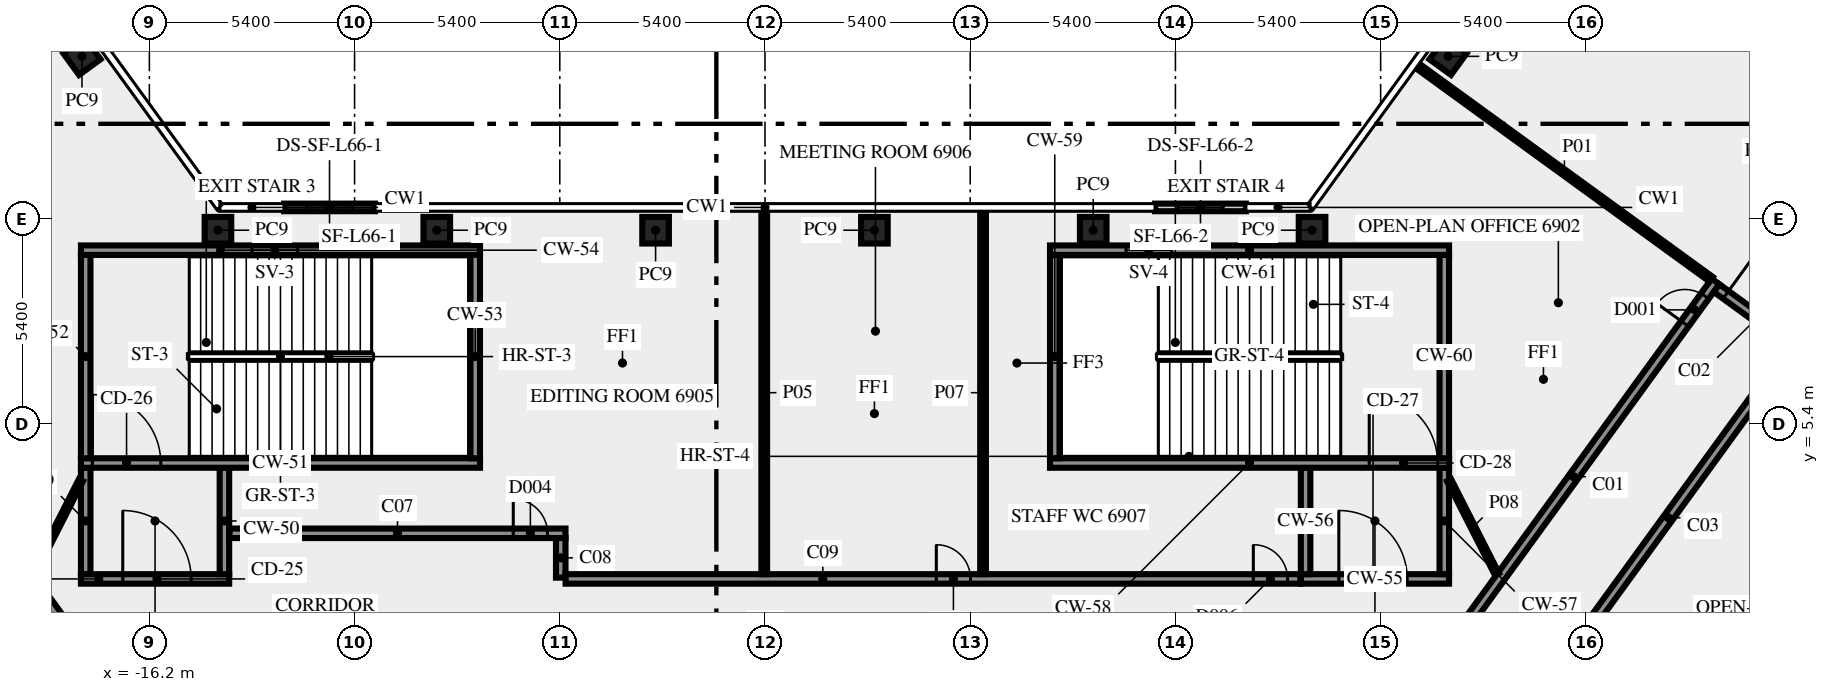
"""IFC4 building model, lengths in metres.
Left out: names, types, materials, properties, quantities, classifications, styles, units other than length and angle.
Written with IfcOpenShell. Run it as: python <this file> out.ifc"""

import sys

from ifc_helpers import new_model, si_unit, direction, frame, frame_2d, origin, origin_2d, place, context, subcontext, project, spatial, rectangle, extrude, element, fill, save


model = new_model("IFC4")
c1 = context("Model", 3, precision=1e-05, world=origin(), true_north=direction((0.0, 1.0)))
c2 = subcontext(c1, "Body", "Model", "MODEL_VIEW")
j1 = project(units=[si_unit("LENGTHUNIT", "METRE"), si_unit("PLANEANGLEUNIT", "RADIAN")], contexts=[c1])
p1 = place(None, origin())
s1 = spatial("IfcSite", under=j1, at=p1, CompositionType="ELEMENT")
p2 = place(p1, origin())
s2 = spatial("IfcBuilding", under=s1, at=p2, CompositionType="ELEMENT")
p3 = place(p2, frame((0.0, 0.0, 297.0)))
s3 = spatial("IfcBuildingStorey", under=s2, at=p3, CompositionType="ELEMENT", Elevation=297.0)
for number, where, z_axis, x_axis in (
    (1, (-17.974, 15.075, 0.0), (0.0, 0.0, 1.0), (-0.588, 0.809, 0.0)),
    (2, (17.974, 15.075, 0.0), (0.0, 0.0, 1.0), (-0.588, -0.809, 0.0)),
    (3, (14.395, 10.5, 0.0), (0.0, 0.0, 1.0), (-1.0, 0.0, 0.0)),
    (4, (8.637, 10.5, 0.0), (0.0, 0.0, 1.0), (-1.0, 0.0, 0.0)),
    (5, (2.879, 10.5, 0.0), (0.0, 0.0, 1.0), (-1.0, 0.0, 0.0)),
    (6, (-2.879, 10.5, 0.0), (0.0, 0.0, 1.0), (-1.0, 0.0, 0.0)),
    (7, (-8.637, 10.5, 0.0), (0.0, 0.0, 1.0), (-1.0, 0.0, 0.0)),
    (8, (-14.395, 10.5, 0.0), (0.0, 0.0, 1.0), (-1.0, 0.0, 0.0)),
):
    element("IfcColumn", number, at=place(p3, frame(where, z_axis=z_axis, x_axis=x_axis)), inside=s3, PredefinedType="COLUMN", context=c2, shape_type="SweptSolid", body=[
        extrude(rectangle(XDim=0.7, YDim=0.7, at=origin_2d()), origin(), (0.0, 0.0, 1.0), 3.4),
    ])
p4 = place(p3, frame((12.655, 11.1, 0.0), z_axis=(0.0, 0.0, 1.0), x_axis=(-1.0, 0.0, 0.0)))
e9 = element("IfcWall", 9, at=p4, inside=s3, PredefinedType="SOLIDWALL", context=c2, shape_type="SweptSolid", body=[
    extrude(rectangle(XDim=2.392, YDim=0.2, at=frame_2d((1.196, 0.0))), origin(), (0.0, 0.0, 1.0), 3.4),
])
p5 = place(p4, frame((0.596, 0.0, 1.0)))
e10 = element("IfcOpeningElement", 10, at=p5, cuts=e9, PredefinedType="OPENING", context=c2, shape_type="SweptSolid", body=[
    extrude(rectangle(XDim=1.2, YDim=1.2, at=frame_2d((0.6, 0.6))), frame((0.0, 0.11, 0.0), z_axis=(0.0, -1.0, 0.0), x_axis=(1.0, 0.0, 0.0)), (0.0, 0.0, 1.0), 0.22),
])
p6 = place(p3, frame((-10.263, 11.1, 0.0), z_axis=(0.0, 0.0, 1.0), x_axis=(-1.0, 0.0, 0.0)))
e11 = element("IfcWall", 11, at=p6, inside=s3, PredefinedType="SOLIDWALL", context=c2, shape_type="SweptSolid", body=[
    extrude(rectangle(XDim=2.392, YDim=0.2, at=frame_2d((1.196, 0.0))), origin(), (0.0, 0.0, 1.0), 3.4),
])
p7 = place(p6, frame((0.596, 0.0, 1.0)))
e12 = element("IfcOpeningElement", 12, at=p7, cuts=e11, PredefinedType="OPENING", context=c2, shape_type="SweptSolid", body=[
    extrude(rectangle(XDim=1.2, YDim=1.2, at=frame_2d((0.6, 0.6))), frame((0.0, 0.11, 0.0), z_axis=(0.0, -1.0, 0.0), x_axis=(1.0, 0.0, 0.0)), (0.0, 0.0, 1.0), 0.22),
])
p8 = place(p3, frame((-18.0, 1.325, 0.0), z_axis=(0.0, 0.0, 1.0), x_axis=(1.0, 0.0, 0.0)))
e13 = element("IfcWall", 13, at=p8, inside=s3, PredefinedType="SHEAR", context=c2, shape_type="SweptSolid", body=[
    extrude(rectangle(XDim=3.9, YDim=0.25, at=frame_2d((1.95, 0.0))), origin(), (0.0, 0.0, 1.0), 3.4),
])
p9 = place(p8, frame((1.1, 0.0, 0.0)))
e14 = element("IfcOpeningElement", 14, at=p9, cuts=e13, PredefinedType="OPENING", context=c2, shape_type="SweptSolid", body=[
    extrude(rectangle(XDim=1.8, YDim=2.1, at=frame_2d((0.9, 1.05))), frame((0.0, 0.135, 0.0), z_axis=(0.0, -1.0, 0.0), x_axis=(1.0, 0.0, 0.0)), (0.0, 0.0, 1.0), 0.27),
])
for number, where, z_axis, x_axis in (
    (15, (-17.875, 1.45, 0.0), (0.0, 0.0, 1.0), (0.0, 1.0, 0.0)),
    (16, (-14.225, 1.45, 0.0), (0.0, 0.0, 1.0), (0.0, 1.0, 0.0)),
):
    element("IfcWall", number, at=place(p3, frame(where, z_axis=z_axis, x_axis=x_axis)), inside=s3, PredefinedType="SHEAR", context=c2, shape_type="SweptSolid", body=[
        extrude(rectangle(XDim=2.8, YDim=0.25, at=frame_2d((1.4, 0.0))), origin(), (0.0, 0.0, 1.0), 3.4),
    ])
p10 = place(p3, frame((-18.0, 4.375, 0.0), z_axis=(0.0, 0.0, 1.0), x_axis=(1.0, 0.0, 0.0)))
e17 = element("IfcWall", 17, at=p10, inside=s3, PredefinedType="SHEAR", context=c2, shape_type="SweptSolid", body=[
    extrude(rectangle(XDim=10.5, YDim=0.25, at=frame_2d((5.25, 0.0))), origin(), (0.0, 0.0, 1.0), 3.4),
])
p11 = place(p10, frame((0.3, 0.0, 0.0)))
e18 = element("IfcOpeningElement", 18, at=p11, cuts=e17, PredefinedType="OPENING", context=c2, shape_type="SweptSolid", body=[
    extrude(rectangle(XDim=1.8, YDim=2.1, at=frame_2d((0.9, 1.05))), frame((0.0, 0.135, 0.0), z_axis=(0.0, -1.0, 0.0), x_axis=(1.0, 0.0, 0.0)), (0.0, 0.0, 1.0), 0.27),
])
for number, where, z_axis, x_axis in (
    (19, (-17.875, 4.5, 0.0), (0.0, 0.0, 1.0), (0.0, 1.0, 0.0)),
    (20, (-7.625, 4.5, 0.0), (0.0, 0.0, 1.0), (0.0, 1.0, 0.0)),
):
    element("IfcWall", number, at=place(p3, frame(where, z_axis=z_axis, x_axis=x_axis)), inside=s3, PredefinedType="SHEAR", context=c2, shape_type="SweptSolid", body=[
        extrude(rectangle(XDim=5.35, YDim=0.25, at=frame_2d((2.675, 0.0))), origin(), (0.0, 0.0, 1.0), 3.4),
    ])
p12 = place(p3, frame((-18.0, 9.975, 0.0), z_axis=(0.0, 0.0, 1.0), x_axis=(1.0, 0.0, 0.0)))
e21 = element("IfcWall", 21, at=p12, inside=s3, PredefinedType="SHEAR", context=c2, shape_type="SweptSolid", body=[
    extrude(rectangle(XDim=10.5, YDim=0.25, at=frame_2d((5.25, 0.0))), origin(), (0.0, 0.0, 1.0), 3.4),
])
p13 = place(p12, frame((4.5, 0.0, 1.0)))
e22 = element("IfcOpeningElement", 22, at=p13, cuts=e21, PredefinedType="OPENING", context=c2, shape_type="SweptSolid", body=[
    extrude(rectangle(XDim=1.2, YDim=1.2, at=frame_2d((0.6, 0.6))), frame((0.0, 0.135, 0.0), z_axis=(0.0, -1.0, 0.0), x_axis=(1.0, 0.0, 0.0)), (0.0, 0.0, 1.0), 0.27),
])
p14 = place(p3, frame((14.1, 1.325, 0.0), z_axis=(0.0, 0.0, 1.0), x_axis=(1.0, 0.0, 0.0)))
e23 = element("IfcWall", 23, at=p14, inside=s3, PredefinedType="SHEAR", context=c2, shape_type="SweptSolid", body=[
    extrude(rectangle(XDim=3.9, YDim=0.25, at=frame_2d((1.95, 0.0))), origin(), (0.0, 0.0, 1.0), 3.4),
])
p15 = place(p14, frame((1.0, 0.0, 0.0)))
e24 = element("IfcOpeningElement", 24, at=p15, cuts=e23, PredefinedType="OPENING", context=c2, shape_type="SweptSolid", body=[
    extrude(rectangle(XDim=1.8, YDim=2.1, at=frame_2d((0.9, 1.05))), frame((0.0, 0.135, 0.0), z_axis=(0.0, -1.0, 0.0), x_axis=(1.0, 0.0, 0.0)), (0.0, 0.0, 1.0), 0.27),
])
for number, where, z_axis, x_axis in (
    (25, (14.225, 1.45, 0.0), (0.0, 0.0, 1.0), (0.0, 1.0, 0.0)),
    (26, (17.875, 1.45, 0.0), (0.0, 0.0, 1.0), (0.0, 1.0, 0.0)),
):
    element("IfcWall", number, at=place(p3, frame(where, z_axis=z_axis, x_axis=x_axis)), inside=s3, PredefinedType="SHEAR", context=c2, shape_type="SweptSolid", body=[
        extrude(rectangle(XDim=2.8, YDim=0.25, at=frame_2d((1.4, 0.0))), origin(), (0.0, 0.0, 1.0), 3.4),
    ])
p16 = place(p3, frame((7.5, 4.375, 0.0), z_axis=(0.0, 0.0, 1.0), x_axis=(1.0, 0.0, 0.0)))
e27 = element("IfcWall", 27, at=p16, inside=s3, PredefinedType="SHEAR", context=c2, shape_type="SweptSolid", body=[
    extrude(rectangle(XDim=10.5, YDim=0.25, at=frame_2d((5.25, 0.0))), origin(), (0.0, 0.0, 1.0), 3.4),
])
p17 = place(p16, frame((8.4, 0.0, 0.0)))
e28 = element("IfcOpeningElement", 28, at=p17, cuts=e27, PredefinedType="OPENING", context=c2, shape_type="SweptSolid", body=[
    extrude(rectangle(XDim=1.8, YDim=2.1, at=frame_2d((0.9, 1.05))), frame((0.0, 0.135, 0.0), z_axis=(0.0, -1.0, 0.0), x_axis=(1.0, 0.0, 0.0)), (0.0, 0.0, 1.0), 0.27),
])
for number, where, z_axis, x_axis in (
    (29, (7.625, 4.5, 0.0), (0.0, 0.0, 1.0), (0.0, 1.0, 0.0)),
    (30, (17.875, 4.5, 0.0), (0.0, 0.0, 1.0), (0.0, 1.0, 0.0)),
):
    element("IfcWall", number, at=place(p3, frame(where, z_axis=z_axis, x_axis=x_axis)), inside=s3, PredefinedType="SHEAR", context=c2, shape_type="SweptSolid", body=[
        extrude(rectangle(XDim=5.35, YDim=0.25, at=frame_2d((2.675, 0.0))), origin(), (0.0, 0.0, 1.0), 3.4),
    ])
p18 = place(p3, frame((7.5, 9.975, 0.0), z_axis=(0.0, 0.0, 1.0), x_axis=(1.0, 0.0, 0.0)))
e31 = element("IfcWall", 31, at=p18, inside=s3, PredefinedType="SHEAR", context=c2, shape_type="SweptSolid", body=[
    extrude(rectangle(XDim=10.5, YDim=0.25, at=frame_2d((5.25, 0.0))), origin(), (0.0, 0.0, 1.0), 3.4),
])
p19 = place(p18, frame((2.0, 0.0, 1.0)))
e32 = element("IfcOpeningElement", 32, at=p19, cuts=e31, PredefinedType="OPENING", context=c2, shape_type="SweptSolid", body=[
    extrude(rectangle(XDim=1.2, YDim=1.2, at=frame_2d((0.6, 0.6))), frame((0.0, 0.135, 0.0), z_axis=(0.0, -1.0, 0.0), x_axis=(1.0, 0.0, 0.0)), (0.0, 0.0, 1.0), 0.27),
])
p20 = place(p3, frame((17.545, -1.125, 0.0), z_axis=(0.0, 0.0, 1.0), x_axis=(0.587796810203, 0.809008596935, 0.0)))
e33 = element("IfcWall", 33, at=p20, inside=s3, PredefinedType="SOLIDWALL", context=c2, shape_type="SweptSolid", body=[
    extrude(rectangle(XDim=12.703, YDim=0.25, at=frame_2d((6.352, 0.0))), origin(), (0.0, 0.0, 1.0), 3.4),
])
p21 = place(p20, frame((11.329, 0.0, 0.0)))
e34 = element("IfcOpeningElement", 34, at=p21, cuts=e33, PredefinedType="OPENING", context=c2, shape_type="SweptSolid", body=[
    extrude(rectangle(XDim=0.9, YDim=2.1, at=frame_2d((0.45, 1.05))), frame((0.0, 0.135, 0.0), z_axis=(0.0, -1.0, 0.0), x_axis=(1.0, 0.0, 0.0)), (0.0, 0.0, 1.0), 0.27),
])
p22 = place(p3, frame((25.039, 8.978, 0.0), z_axis=(0.0, 0.0, 1.0), x_axis=(0.809006914995, -0.587799125119, 0.0)))
e35 = element("IfcWall", 35, at=p22, inside=s3, PredefinedType="SOLIDWALL", context=c2, shape_type="SweptSolid", body=[
    extrude(rectangle(XDim=2.65, YDim=0.25, at=frame_2d((1.325, 0.0))), origin(), (0.0, 0.0, 1.0), 3.4),
])
p23 = place(p22, frame((0.301, 0.0, 0.0)))
e36 = element("IfcOpeningElement", 36, at=p23, cuts=e35, PredefinedType="OPENING", context=c2, shape_type="SweptSolid", body=[
    extrude(rectangle(XDim=1.8, YDim=2.1, at=frame_2d((0.9, 1.05))), frame((0.0, 0.135, 0.0), z_axis=(0.0, -1.0, 0.0), x_axis=(1.0, 0.0, 0.0)), (0.0, 0.0, 1.0), 0.27),
])
p24 = place(p3, frame((27.009, 7.392, 0.0), z_axis=(0.0, 0.0, 1.0), x_axis=(-0.587776457057, -0.809023384414, 0.0)))
e37 = element("IfcWall", 37, at=p24, inside=s3, PredefinedType="SOLIDWALL", context=c2, shape_type="SweptSolid", body=[
    extrude(rectangle(XDim=11.021, YDim=0.25, at=frame_2d((5.51, 0.0))), origin(), (0.0, 0.0, 1.0), 3.4),
])
p25 = place(p24, frame((0.225, 0.0, 0.0)))
e38 = element("IfcOpeningElement", 38, at=p25, cuts=e37, PredefinedType="OPENING", context=c2, shape_type="SweptSolid", body=[
    extrude(rectangle(XDim=0.9, YDim=2.1, at=frame_2d((0.45, 1.05))), frame((0.0, 0.135, 0.0), z_axis=(0.0, -1.0, 0.0), x_axis=(1.0, 0.0, 0.0)), (0.0, 0.0, 1.0), 0.27),
])
p26 = place(p3, frame((-28.039, 13.319, 0.0), z_axis=(0.0, 0.0, 1.0), x_axis=(0.587791911753, -0.809012155952, 0.0)))
e39 = element("IfcWall", 39, at=p26, inside=s3, PredefinedType="SOLIDWALL", context=c2, shape_type="SweptSolid", body=[
    extrude(rectangle(XDim=17.853, YDim=0.25, at=frame_2d((8.927, 0.0))), origin(), (0.0, 0.0, 1.0), 3.4),
])
p27 = place(p26, frame((0.225, 0.0, 0.0)))
e40 = element("IfcOpeningElement", 40, at=p27, cuts=e39, PredefinedType="OPENING", context=c2, shape_type="SweptSolid", body=[
    extrude(rectangle(XDim=0.9, YDim=2.1, at=frame_2d((0.45, 1.05))), frame((0.0, 0.135, 0.0), z_axis=(0.0, -1.0, 0.0), x_axis=(1.0, 0.0, 0.0)), (0.0, 0.0, 1.0), 0.27),
])
p28 = place(p3, frame((-14.09, 2.525, 0.0), z_axis=(0.0, 0.0, 1.0), x_axis=(1.0, 0.0, 0.0)))
e41 = element("IfcWall", 41, at=p28, inside=s3, PredefinedType="SOLIDWALL", context=c2, shape_type="SweptSolid", body=[
    extrude(rectangle(XDim=8.84, YDim=0.25, at=frame_2d((4.42, 0.0))), origin(), (0.0, 0.0, 1.0), 3.4),
])
p29 = place(p28, frame((7.466, 0.0, 0.0)))
e42 = element("IfcOpeningElement", 42, at=p29, cuts=e41, PredefinedType="OPENING", context=c2, shape_type="SweptSolid", body=[
    extrude(rectangle(XDim=0.9, YDim=2.1, at=frame_2d((0.45, 1.05))), frame((0.0, 0.135, 0.0), z_axis=(0.0, -1.0, 0.0), x_axis=(1.0, 0.0, 0.0)), (0.0, 0.0, 1.0), 0.27),
])
p30 = place(p3, frame((-5.375, 2.4, 0.0), z_axis=(0.0, 0.0, 1.0), x_axis=(0.0, -1.0, 0.0)))
e43 = element("IfcWall", 43, at=p30, inside=s3, PredefinedType="SOLIDWALL", context=c2, shape_type="SweptSolid", body=[
    extrude(rectangle(XDim=1.041, YDim=0.25, at=frame_2d((0.521, 0.0))), origin(), (0.0, 0.0, 1.0), 3.4),
])
p31 = place(p3, frame((-5.246, 1.325, 0.0), z_axis=(0.0, 0.0, 1.0), x_axis=(1.0, 0.0, 0.0)))
e44 = element("IfcWall", 44, at=p31, inside=s3, PredefinedType="SOLIDWALL", context=c2, shape_type="SweptSolid", body=[
    extrude(rectangle(XDim=19.336, YDim=0.25, at=frame_2d((9.668, 0.0))), origin(), (0.0, 0.0, 1.0), 3.4),
])
p32 = place(p31, frame((9.754, 0.0, 0.0)))
e45 = element("IfcOpeningElement", 45, at=p32, cuts=e44, PredefinedType="OPENING", context=c2, shape_type="SweptSolid", body=[
    extrude(rectangle(XDim=0.9, YDim=2.1, at=frame_2d((0.45, 1.05))), frame((0.0, 0.135, 0.0), z_axis=(0.0, -1.0, 0.0), x_axis=(1.0, 0.0, 0.0)), (0.0, 0.0, 1.0), 0.27),
])
p33 = place(p31, frame((18.096, 0.0, 0.0)))
e46 = element("IfcOpeningElement", 46, at=p33, cuts=e44, PredefinedType="OPENING", context=c2, shape_type="SweptSolid", body=[
    extrude(rectangle(XDim=0.9, YDim=2.1, at=frame_2d((0.45, 1.05))), frame((0.0, 0.135, 0.0), z_axis=(0.0, -1.0, 0.0), x_axis=(1.0, 0.0, 0.0)), (0.0, 0.0, 1.0), 0.27),
])
p34 = place(p3, frame((24.898, 9.209, 0.0), z_axis=(0.0, 0.0, 1.0), x_axis=(-0.809013490065, 0.587790075531, 0.0)))
e47 = element("IfcWall", 47, at=p34, inside=s3, PredefinedType="PARTITIONING", context=c2, shape_type="SweptSolid", body=[
    extrude(rectangle(XDim=9.549, YDim=0.15, at=frame_2d((4.775, 0.0))), origin(), (0.0, 0.0, 1.0), 2.7),
])
for number, where, z_axis, x_axis in (
    (48, (-0.02, 1.45, 0.0), (0.0, 0.0, 1.0), (0.0, 1.0, 0.0)),
    (49, (5.738, 1.45, 0.0), (0.0, 0.0, 1.0), (0.0, 1.0, 0.0)),
):
    element("IfcWall", number, at=place(p3, frame(where, z_axis=z_axis, x_axis=x_axis)), inside=s3, PredefinedType="PARTITIONING", context=c2, shape_type="SweptSolid", body=[
        extrude(rectangle(XDim=9.55, YDim=0.15, at=frame_2d((4.775, 0.0))), origin(), (0.0, 0.0, 1.0), 2.7),
    ])
for number, where, z_axis, x_axis in (
    (50, (18.0, 3.925, 0.0), (0.0, 0.0, 1.0), (0.454, -0.891, 0.0)),
    (51, (-19.261, 1.45, 0.0), (0.0, 0.0, 1.0), (0.454, 0.891, 0.0)),
):
    element("IfcWall", number, at=place(p3, frame(where, z_axis=z_axis, x_axis=x_axis)), inside=s3, PredefinedType="PARTITIONING", context=c2, shape_type="SweptSolid", body=[
        extrude(rectangle(XDim=2.778, YDim=0.12, at=frame_2d((1.389, 0.0))), origin(), (0.0, 0.0, 1.0), 3.4),
    ])
p35 = place(p5, origin())
e52 = element("IfcWindow", 52, at=p35, inside=s3, PartitioningType="SINGLE_PANEL", PredefinedType="WINDOW", context=c2, shape_type="SweptSolid", body=[
    extrude(rectangle(XDim=1.2, YDim=1.2, at=frame_2d((0.6, 0.6))), frame((0.0, 0.03, 0.0), z_axis=(0.0, -1.0, 0.0), x_axis=(1.0, 0.0, 0.0)), (0.0, 0.0, 1.0), 0.06),
])
fill(e10, e52)
p36 = place(p7, origin())
e53 = element("IfcWindow", 53, at=p36, inside=s3, PartitioningType="SINGLE_PANEL", PredefinedType="WINDOW", context=c2, shape_type="SweptSolid", body=[
    extrude(rectangle(XDim=1.2, YDim=1.2, at=frame_2d((0.6, 0.6))), frame((0.0, 0.03, 0.0), z_axis=(0.0, -1.0, 0.0), x_axis=(1.0, 0.0, 0.0)), (0.0, 0.0, 1.0), 0.06),
])
fill(e12, e53)
p37 = place(p9, origin())
e54 = element("IfcDoor", 54, at=p37, inside=s3, OperationType="DOUBLE_DOOR_SINGLE_SWING", PredefinedType="DOOR", context=c2, shape_type="SweptSolid", body=[
    extrude(rectangle(XDim=1.8, YDim=2.1, at=frame_2d((0.9, 1.05))), frame((0.0, 0.025, 0.0), z_axis=(0.0, -1.0, 0.0), x_axis=(1.0, 0.0, 0.0)), (0.0, 0.0, 1.0), 0.05),
])
fill(e14, e54)
p38 = place(p11, origin())
e55 = element("IfcDoor", 55, at=p38, inside=s3, OperationType="DOUBLE_DOOR_SINGLE_SWING", PredefinedType="DOOR", context=c2, shape_type="SweptSolid", body=[
    extrude(rectangle(XDim=1.8, YDim=2.1, at=frame_2d((0.9, 1.05))), frame((0.0, 0.025, 0.0), z_axis=(0.0, -1.0, 0.0), x_axis=(1.0, 0.0, 0.0)), (0.0, 0.0, 1.0), 0.05),
])
fill(e18, e55)
p39 = place(p13, origin())
e56 = element("IfcWindow", 56, at=p39, inside=s3, PartitioningType="SINGLE_PANEL", PredefinedType="WINDOW", context=c2, shape_type="SweptSolid", body=[
    extrude(rectangle(XDim=1.2, YDim=1.2, at=frame_2d((0.6, 0.6))), frame((0.0, 0.03, 0.0), z_axis=(0.0, -1.0, 0.0), x_axis=(1.0, 0.0, 0.0)), (0.0, 0.0, 1.0), 0.06),
])
fill(e22, e56)
p40 = place(p15, origin())
e57 = element("IfcDoor", 57, at=p40, inside=s3, OperationType="DOUBLE_DOOR_SINGLE_SWING", PredefinedType="DOOR", context=c2, shape_type="SweptSolid", body=[
    extrude(rectangle(XDim=1.8, YDim=2.1, at=frame_2d((0.9, 1.05))), frame((0.0, 0.025, 0.0), z_axis=(0.0, -1.0, 0.0), x_axis=(1.0, 0.0, 0.0)), (0.0, 0.0, 1.0), 0.05),
])
fill(e24, e57)
p41 = place(p17, origin())
e58 = element("IfcDoor", 58, at=p41, inside=s3, OperationType="DOUBLE_DOOR_SINGLE_SWING", PredefinedType="DOOR", context=c2, shape_type="SweptSolid", body=[
    extrude(rectangle(XDim=1.8, YDim=2.1, at=frame_2d((0.9, 1.05))), frame((0.0, 0.025, 0.0), z_axis=(0.0, -1.0, 0.0), x_axis=(1.0, 0.0, 0.0)), (0.0, 0.0, 1.0), 0.05),
])
fill(e28, e58)
p42 = place(p19, origin())
e59 = element("IfcWindow", 59, at=p42, inside=s3, PartitioningType="SINGLE_PANEL", PredefinedType="WINDOW", context=c2, shape_type="SweptSolid", body=[
    extrude(rectangle(XDim=1.2, YDim=1.2, at=frame_2d((0.6, 0.6))), frame((0.0, 0.03, 0.0), z_axis=(0.0, -1.0, 0.0), x_axis=(1.0, 0.0, 0.0)), (0.0, 0.0, 1.0), 0.06),
])
fill(e32, e59)
p43 = place(p21, origin())
e60 = element("IfcDoor", 60, at=p43, inside=s3, OperationType="SINGLE_SWING_RIGHT", PredefinedType="DOOR", context=c2, shape_type="SweptSolid", body=[
    extrude(rectangle(XDim=0.9, YDim=2.1, at=frame_2d((0.45, 1.05))), frame((0.0, 0.025, 0.0), z_axis=(0.0, -1.0, 0.0), x_axis=(1.0, 0.0, 0.0)), (0.0, 0.0, 1.0), 0.05),
])
fill(e34, e60)
p44 = place(p29, origin())
e61 = element("IfcDoor", 61, at=p44, inside=s3, OperationType="SINGLE_SWING_RIGHT", PredefinedType="DOOR", context=c2, shape_type="SweptSolid", body=[
    extrude(rectangle(XDim=0.9, YDim=2.1, at=frame_2d((0.45, 1.05))), frame((0.0, 0.025, 0.0), z_axis=(0.0, -1.0, 0.0), x_axis=(1.0, 0.0, 0.0)), (0.0, 0.0, 1.0), 0.05),
])
fill(e42, e61)
p45 = place(p32, origin())
e62 = element("IfcDoor", 62, at=p45, inside=s3, OperationType="SINGLE_SWING_RIGHT", PredefinedType="DOOR", context=c2, shape_type="SweptSolid", body=[
    extrude(rectangle(XDim=0.9, YDim=2.1, at=frame_2d((0.45, 1.05))), frame((0.0, 0.025, 0.0), z_axis=(0.0, -1.0, 0.0), x_axis=(1.0, 0.0, 0.0)), (0.0, 0.0, 1.0), 0.05),
])
fill(e45, e62)
p46 = place(p23, origin())
e63 = element("IfcDoor", 63, at=p46, inside=s3, OperationType="DOUBLE_DOOR_SINGLE_SWING", PredefinedType="DOOR", context=c2, shape_type="SweptSolid", body=[
    extrude(rectangle(XDim=1.8, YDim=2.1, at=frame_2d((0.9, 1.05))), frame((0.0, 0.025, 0.0), z_axis=(0.0, -1.0, 0.0), x_axis=(1.0, 0.0, 0.0)), (0.0, 0.0, 1.0), 0.05),
])
fill(e36, e63)
p47 = place(p33, origin())
e64 = element("IfcDoor", 64, at=p47, inside=s3, OperationType="SINGLE_SWING_RIGHT", PredefinedType="DOOR", context=c2, shape_type="SweptSolid", body=[
    extrude(rectangle(XDim=0.9, YDim=2.1, at=frame_2d((0.45, 1.05))), frame((0.0, 0.025, 0.0), z_axis=(0.0, -1.0, 0.0), x_axis=(1.0, 0.0, 0.0)), (0.0, 0.0, 1.0), 0.05),
])
fill(e46, e64)
save(model, sys.argv[1])
